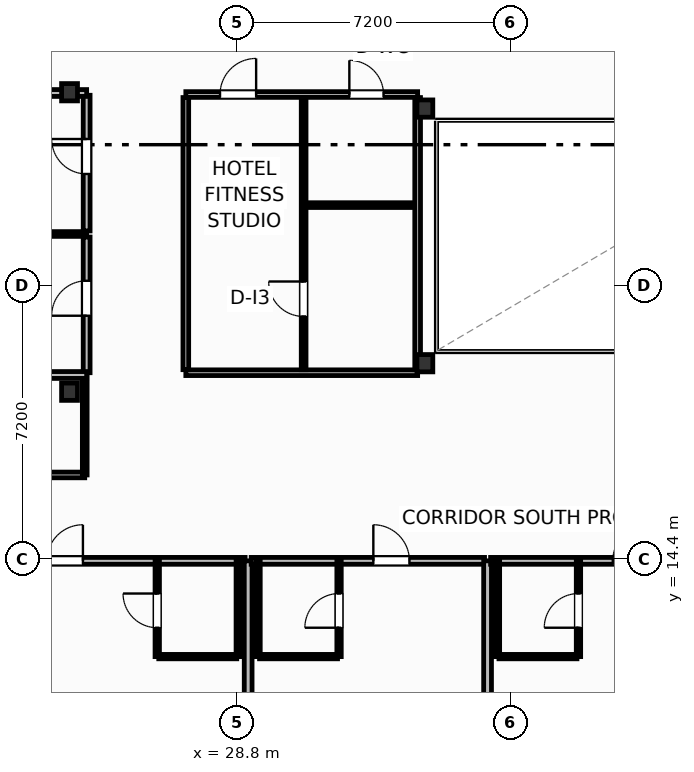
"""IFC4 building model, lengths in metres.
Left out: names, types, materials, properties, quantities, classifications, styles, units other than length and angle.
Written with IfcOpenShell. Run it as: python <this file> out.ifc"""

import sys

from ifc_helpers import new_model, si_unit, direction, frame, frame_2d, origin, origin_2d, place, context, subcontext, project, spatial, rectangle, i_section, extrude, element, fill, save


model = new_model("IFC4")
c1 = context("Model", 3, precision=1e-05, world=origin(), true_north=direction((0.0, 1.0)))
c2 = subcontext(c1, "Body", "Model", "MODEL_VIEW")
j1 = project(units=[si_unit("LENGTHUNIT", "METRE"), si_unit("PLANEANGLEUNIT", "RADIAN")], contexts=[c1])
p1 = place(None, origin())
s1 = spatial("IfcSite", under=j1, at=p1, CompositionType="ELEMENT")
p2 = place(p1, origin())
s2 = spatial("IfcBuilding", under=s1, at=p2, CompositionType="ELEMENT")
p3 = place(p2, frame((0.0, 0.0, 200.5)))
s3 = spatial("IfcBuildingStorey", under=s2, at=p3, CompositionType="ELEMENT", Elevation=200.5)
for number, where, z_axis, x_axis in (
    (1, (33.75, 19.55, 0.0), (0.0, 0.0, 1.0), (1.0, 0.0, 0.0)),
    (2, (33.75, 26.25, 0.0), (0.0, 0.0, 1.0), (1.0, 0.0, 0.0)),
    (3, (24.4, 18.8, 0.0), (0.0, 0.0, 1.0), (1.0, 0.0, 0.0)),
    (4, (24.4, 26.68, 0.0), (0.0, 0.0, 1.0), (1.0, 0.0, 0.0)),
):
    element("IfcColumn", number, at=place(p3, frame(where, z_axis=z_axis, x_axis=x_axis)), inside=s3, PredefinedType="COLUMN", context=c2, shape_type="SweptSolid", body=[
        extrude(i_section(OverallWidth=0.418, OverallDepth=0.455, WebThickness=0.042, FlangeThickness=0.068, FilletRadius=0.025, at=origin_2d()), origin(), (0.0, 0.0, 1.0), 3.7),
    ])
p4 = place(p3, frame((5.0, 16.61, 0.0), z_axis=(0.0, 0.0, 1.0), x_axis=(1.0, 0.0, 0.0)))
e5 = element("IfcWall", 5, at=p4, inside=s3, PredefinedType="PARTITIONING", context=c2, shape_type="SweptSolid", body=[
    extrude(rectangle(XDim=19.8, YDim=0.15, at=frame_2d((9.9, 0.0))), origin(), (0.0, 0.0, 1.0), 3.45),
])
p5 = place(p4, frame((12.485, 0.0, 0.0)))
e6 = element("IfcOpeningElement", 6, at=p5, cuts=e5, PredefinedType="OPENING", context=c2, shape_type="SweptSolid", body=[
    extrude(rectangle(XDim=0.92, YDim=2.05, at=frame_2d((0.46, 1.025))), frame((0.0, 0.085, 0.0), z_axis=(0.0, -1.0, 0.0), x_axis=(1.0, 0.0, 0.0)), (0.0, 0.0, 1.0), 0.17),
])
p6 = place(p3, frame((24.8, 16.61, 0.0), z_axis=(0.0, 0.0, 1.0), x_axis=(0.0, 1.0, 0.0)))
e7 = element("IfcWall", 7, at=p6, inside=s3, PredefinedType="PARTITIONING", context=c2, shape_type="SweptSolid", body=[
    extrude(rectangle(XDim=2.63, YDim=0.125, at=frame_2d((1.315, 0.0))), origin(), (0.0, 0.0, 1.0), 3.45),
])
p7 = place(p3, frame((22.88, 14.35, 0.0), z_axis=(0.0, 0.0, 1.0), x_axis=(1.0, 0.0, 0.0)))
e8 = element("IfcWall", 8, at=p7, inside=s3, PredefinedType="PARTITIONING", context=c2, shape_type="SweptSolid", body=[
    extrude(rectangle(XDim=6.14, YDim=0.18, at=frame_2d((3.07, 0.0))), origin(), (0.0, 0.0, 1.0), 3.45),
])
p8 = place(p7, frame((0.922, 0.0, 0.0)))
e9 = element("IfcOpeningElement", 9, at=p8, cuts=e8, PredefinedType="OPENING", context=c2, shape_type="SweptSolid", body=[
    extrude(rectangle(XDim=0.95, YDim=2.15, at=frame_2d((0.475, 1.075))), frame((0.0, 0.1, 0.0), z_axis=(0.0, -1.0, 0.0), x_axis=(1.0, 0.0, 0.0)), (0.0, 0.0, 1.0), 0.2),
])
p9 = place(p3, frame((26.748, 11.83, 0.0), z_axis=(0.0, 0.0, 1.0), x_axis=(1.0, 0.0, 0.0)))
e10 = element("IfcWall", 10, at=p9, inside=s3, PredefinedType="PARTITIONING", context=c2, shape_type="SweptSolid", body=[
    extrude(rectangle(XDim=2.052, YDim=0.115, at=frame_2d((1.026, 0.0))), origin(), (0.0, 0.0, 1.0), 3.45),
])
p10 = place(p3, frame((26.708, 11.83, 0.0), z_axis=(0.0, 0.0, 1.0), x_axis=(0.0, 1.0, 0.0)))
e11 = element("IfcWall", 11, at=p10, inside=s3, PredefinedType="PARTITIONING", context=c2, shape_type="SweptSolid", body=[
    extrude(rectangle(XDim=2.52, YDim=0.115, at=frame_2d((1.26, 0.0))), origin(), (0.0, 0.0, 1.0), 3.45),
])
p11 = place(p10, frame((0.76, 0.0, 0.0)))
e12 = element("IfcOpeningElement", 12, at=p11, cuts=e11, PredefinedType="OPENING", context=c2, shape_type="SweptSolid", body=[
    extrude(rectangle(XDim=0.9, YDim=2.05, at=frame_2d((0.45, 1.025))), frame((0.0, 0.067, 0.0), z_axis=(0.0, -1.0, 0.0), x_axis=(1.0, 0.0, 0.0)), (0.0, 0.0, 1.0), 0.135),
])
p12 = place(p3, frame((28.84, 11.83, 0.0), z_axis=(0.0, 0.0, 1.0), x_axis=(0.0, 1.0, 0.0)))
e13 = element("IfcWall", 13, at=p12, inside=s3, PredefinedType="PARTITIONING", context=c2, shape_type="SweptSolid", body=[
    extrude(rectangle(XDim=2.52, YDim=0.115, at=frame_2d((1.26, 0.0))), origin(), (0.0, 0.0, 1.0), 3.45),
])
p13 = place(p3, frame((29.1, 4.272, 0.0), z_axis=(0.0, 0.0, 1.0), x_axis=(0.0, 1.0, 0.0)))
e14 = element("IfcWall", 14, at=p13, inside=s3, PredefinedType="PARTITIONING", context=c2, shape_type="SweptSolid", body=[
    extrude(rectangle(XDim=10.078, YDim=0.205, at=frame_2d((5.039, 0.0))), origin(), (0.0, 0.0, 1.0), 3.45),
])
p14 = place(p3, frame((29.18, 14.35, 0.0), z_axis=(0.0, 0.0, 1.0), x_axis=(1.0, 0.0, 0.0)))
e15 = element("IfcWall", 15, at=p14, inside=s3, PredefinedType="PARTITIONING", context=c2, shape_type="SweptSolid", body=[
    extrude(rectangle(XDim=6.14, YDim=0.18, at=frame_2d((3.07, 0.0))), origin(), (0.0, 0.0, 1.0), 3.45),
])
p15 = place(p14, frame((3.214, 0.0, 0.0)))
e16 = element("IfcOpeningElement", 16, at=p15, cuts=e15, PredefinedType="OPENING", context=c2, shape_type="SweptSolid", body=[
    extrude(rectangle(XDim=0.95, YDim=2.15, at=frame_2d((0.475, 1.075))), frame((0.0, 0.1, 0.0), z_axis=(0.0, -1.0, 0.0), x_axis=(1.0, 0.0, 0.0)), (0.0, 0.0, 1.0), 0.2),
])
p16 = place(p3, frame((29.4, 11.83, 0.0), z_axis=(0.0, 0.0, 1.0), x_axis=(1.0, 0.0, 0.0)))
e17 = element("IfcWall", 17, at=p16, inside=s3, PredefinedType="PARTITIONING", context=c2, shape_type="SweptSolid", body=[
    extrude(rectangle(XDim=2.052, YDim=0.115, at=frame_2d((1.026, 0.0))), origin(), (0.0, 0.0, 1.0), 3.45),
])
p17 = place(p3, frame((31.492, 11.83, 0.0), z_axis=(0.0, 0.0, 1.0), x_axis=(0.0, 1.0, 0.0)))
e18 = element("IfcWall", 18, at=p17, inside=s3, PredefinedType="PARTITIONING", context=c2, shape_type="SweptSolid", body=[
    extrude(rectangle(XDim=2.52, YDim=0.115, at=frame_2d((1.26, 0.0))), origin(), (0.0, 0.0, 1.0), 3.45),
])
p18 = place(p17, frame((0.76, 0.0, 0.0)))
e19 = element("IfcOpeningElement", 19, at=p18, cuts=e18, PredefinedType="OPENING", context=c2, shape_type="SweptSolid", body=[
    extrude(rectangle(XDim=0.9, YDim=2.05, at=frame_2d((0.45, 1.025))), frame((0.0, 0.067, 0.0), z_axis=(0.0, -1.0, 0.0), x_axis=(1.0, 0.0, 0.0)), (0.0, 0.0, 1.0), 0.135),
])
p19 = place(p3, frame((29.36, 11.83, 0.0), z_axis=(0.0, 0.0, 1.0), x_axis=(0.0, 1.0, 0.0)))
e20 = element("IfcWall", 20, at=p19, inside=s3, PredefinedType="PARTITIONING", context=c2, shape_type="SweptSolid", body=[
    extrude(rectangle(XDim=2.52, YDim=0.115, at=frame_2d((1.26, 0.0))), origin(), (0.0, 0.0, 1.0), 3.45),
])
p20 = place(p3, frame((35.4, 2.92, 0.0), z_axis=(0.0, 0.0, 1.0), x_axis=(0.0, 1.0, 0.0)))
e21 = element("IfcWall", 21, at=p20, inside=s3, PredefinedType="PARTITIONING", context=c2, shape_type="SweptSolid", body=[
    extrude(rectangle(XDim=11.43, YDim=0.205, at=frame_2d((5.715, 0.0))), origin(), (0.0, 0.0, 1.0), 3.45),
])
p21 = place(p3, frame((35.48, 14.35, 0.0), z_axis=(0.0, 0.0, 1.0), x_axis=(1.0, 0.0, 0.0)))
e22 = element("IfcWall", 22, at=p21, inside=s3, PredefinedType="PARTITIONING", context=c2, shape_type="SweptSolid", body=[
    extrude(rectangle(XDim=6.14, YDim=0.18, at=frame_2d((3.07, 0.0))), origin(), (0.0, 0.0, 1.0), 3.45),
])
p22 = place(p21, frame((3.214, 0.0, 0.0)))
e23 = element("IfcOpeningElement", 23, at=p22, cuts=e22, PredefinedType="OPENING", context=c2, shape_type="SweptSolid", body=[
    extrude(rectangle(XDim=0.95, YDim=2.15, at=frame_2d((0.475, 1.075))), frame((0.0, 0.1, 0.0), z_axis=(0.0, -1.0, 0.0), x_axis=(1.0, 0.0, 0.0)), (0.0, 0.0, 1.0), 0.2),
])
p23 = place(p3, frame((35.7, 11.83, 0.0), z_axis=(0.0, 0.0, 1.0), x_axis=(1.0, 0.0, 0.0)))
e24 = element("IfcWall", 24, at=p23, inside=s3, PredefinedType="PARTITIONING", context=c2, shape_type="SweptSolid", body=[
    extrude(rectangle(XDim=2.052, YDim=0.115, at=frame_2d((1.026, 0.0))), origin(), (0.0, 0.0, 1.0), 3.45),
])
p24 = place(p3, frame((37.792, 11.83, 0.0), z_axis=(0.0, 0.0, 1.0), x_axis=(0.0, 1.0, 0.0)))
e25 = element("IfcWall", 25, at=p24, inside=s3, PredefinedType="PARTITIONING", context=c2, shape_type="SweptSolid", body=[
    extrude(rectangle(XDim=2.52, YDim=0.115, at=frame_2d((1.26, 0.0))), origin(), (0.0, 0.0, 1.0), 3.45),
])
p25 = place(p24, frame((0.76, 0.0, 0.0)))
e26 = element("IfcOpeningElement", 26, at=p25, cuts=e25, PredefinedType="OPENING", context=c2, shape_type="SweptSolid", body=[
    extrude(rectangle(XDim=0.9, YDim=2.05, at=frame_2d((0.45, 1.025))), frame((0.0, 0.067, 0.0), z_axis=(0.0, -1.0, 0.0), x_axis=(1.0, 0.0, 0.0)), (0.0, 0.0, 1.0), 0.135),
])
p26 = place(p3, frame((35.66, 11.83, 0.0), z_axis=(0.0, 0.0, 1.0), x_axis=(0.0, 1.0, 0.0)))
e27 = element("IfcWall", 27, at=p26, inside=s3, PredefinedType="PARTITIONING", context=c2, shape_type="SweptSolid", body=[
    extrude(rectangle(XDim=2.52, YDim=0.115, at=frame_2d((1.26, 0.0))), origin(), (0.0, 0.0, 1.0), 3.45),
])
p27 = place(p3, frame((24.85, 19.3, 0.0), z_axis=(0.0, 0.0, 1.0), x_axis=(0.0, 1.0, 0.0)))
e28 = element("IfcWall", 28, at=p27, inside=s3, PredefinedType="PARTITIONING", context=c2, shape_type="SweptSolid", body=[
    extrude(rectangle(XDim=3.57, YDim=0.18, at=frame_2d((1.785, 0.0))), origin(), (0.0, 0.0, 1.0), 3.45),
])
p28 = place(p27, frame((1.5, 0.0, 0.0)))
e29 = element("IfcOpeningElement", 29, at=p28, cuts=e28, PredefinedType="OPENING", context=c2, shape_type="SweptSolid", body=[
    extrude(rectangle(XDim=0.92, YDim=2.05, at=frame_2d((0.46, 1.025))), frame((0.0, 0.1, 0.0), z_axis=(0.0, -1.0, 0.0), x_axis=(1.0, 0.0, 0.0)), (0.0, 0.0, 1.0), 0.2),
])
p29 = place(p3, frame((24.85, 23.03, 0.0), z_axis=(0.0, 0.0, 1.0), x_axis=(0.0, 1.0, 0.0)))
e30 = element("IfcWall", 30, at=p29, inside=s3, PredefinedType="PARTITIONING", context=c2, shape_type="SweptSolid", body=[
    extrude(rectangle(XDim=3.57, YDim=0.18, at=frame_2d((1.785, 0.0))), origin(), (0.0, 0.0, 1.0), 3.45),
])
p30 = place(p29, frame((1.5, 0.0, 0.0)))
e31 = element("IfcOpeningElement", 31, at=p30, cuts=e30, PredefinedType="OPENING", context=c2, shape_type="SweptSolid", body=[
    extrude(rectangle(XDim=0.92, YDim=2.05, at=frame_2d((0.46, 1.025))), frame((0.0, 0.1, 0.0), z_axis=(0.0, -1.0, 0.0), x_axis=(1.0, 0.0, 0.0)), (0.0, 0.0, 1.0), 0.2),
])
p31 = place(p3, frame((4.107, 22.95, 0.0), z_axis=(0.0, 0.0, 1.0), x_axis=(1.0, 0.0, 0.0)))
e32 = element("IfcWall", 32, at=p31, inside=s3, PredefinedType="PARTITIONING", context=c2, shape_type="SweptSolid", body=[
    extrude(rectangle(XDim=20.743, YDim=0.125, at=frame_2d((10.371, 0.0))), origin(), (0.0, 0.0, 1.0), 2.662),
])
p32 = place(p3, frame((4.557, 19.24, 0.0), z_axis=(0.0, 0.0, 1.0), x_axis=(1.0, 0.0, 0.0)))
e33 = element("IfcWall", 33, at=p32, inside=s3, PredefinedType="PARTITIONING", context=c2, shape_type="SweptSolid", body=[
    extrude(rectangle(XDim=20.293, YDim=0.18, at=frame_2d((10.146, 0.0))), origin(), (0.0, 0.0, 1.0), 3.45),
])
p33 = place(p3, frame((3.658, 26.66, 0.0), z_axis=(0.0, 0.0, 1.0), x_axis=(1.0, 0.0, 0.0)))
e34 = element("IfcWall", 34, at=p33, inside=s3, PredefinedType="PARTITIONING", context=c2, shape_type="SweptSolid", body=[
    extrude(rectangle(XDim=21.192, YDim=0.18, at=frame_2d((10.596, 0.0))), origin(), (0.0, 0.0, 1.0), 2.662),
])
p34 = place(p3, frame((27.46, 26.62, 0.0), z_axis=(0.0, 0.0, 1.0), x_axis=(1.0, 0.0, 0.0)))
e35 = element("IfcWall", 35, at=p34, inside=s3, PredefinedType="PARTITIONING", context=c2, shape_type="SweptSolid", body=[
    extrude(rectangle(XDim=6.1, YDim=0.15, at=frame_2d((3.05, 0.0))), origin(), (0.0, 0.0, 1.0), 2.662),
])
p35 = place(p34, frame((0.9, 0.0, 0.0)))
e36 = element("IfcOpeningElement", 36, at=p35, cuts=e35, PredefinedType="OPENING", context=c2, shape_type="SweptSolid", body=[
    extrude(rectangle(XDim=0.95, YDim=2.05, at=frame_2d((0.475, 1.025))), frame((0.0, 0.085, 0.0), z_axis=(0.0, -1.0, 0.0), x_axis=(1.0, 0.0, 0.0)), (0.0, 0.0, 1.0), 0.17),
])
p36 = place(p34, frame((4.303, 0.0, 0.0)))
e37 = element("IfcOpeningElement", 37, at=p36, cuts=e35, PredefinedType="OPENING", context=c2, shape_type="SweptSolid", body=[
    extrude(rectangle(XDim=0.9, YDim=2.05, at=frame_2d((0.45, 1.025))), frame((0.0, 0.085, 0.0), z_axis=(0.0, -1.0, 0.0), x_axis=(1.0, 0.0, 0.0)), (0.0, 0.0, 1.0), 0.17),
])
p37 = place(p3, frame((27.46, 19.3, 0.0), z_axis=(0.0, 0.0, 1.0), x_axis=(1.0, 0.0, 0.0)))
e38 = element("IfcWall", 38, at=p37, inside=s3, PredefinedType="PARTITIONING", context=c2, shape_type="SweptSolid", body=[
    extrude(rectangle(XDim=6.1, YDim=0.15, at=frame_2d((3.05, 0.0))), origin(), (0.0, 0.0, 1.0), 2.662),
])
p38 = place(p3, frame((30.56, 19.38, 0.0), z_axis=(0.0, 0.0, 1.0), x_axis=(0.0, 1.0, 0.0)))
e39 = element("IfcWall", 39, at=p38, inside=s3, PredefinedType="PARTITIONING", context=c2, shape_type="SweptSolid", body=[
    extrude(rectangle(XDim=7.16, YDim=0.125, at=frame_2d((3.58, 0.0))), origin(), (0.0, 0.0, 1.0), 3.45),
])
p39 = place(p38, frame((1.4, 0.0, 0.0)))
e40 = element("IfcOpeningElement", 40, at=p39, cuts=e39, PredefinedType="OPENING", context=c2, shape_type="SweptSolid", body=[
    extrude(rectangle(XDim=0.92, YDim=2.05, at=frame_2d((0.46, 1.025))), frame((0.0, 0.073, 0.0), z_axis=(0.0, -1.0, 0.0), x_axis=(1.0, 0.0, 0.0)), (0.0, 0.0, 1.0), 0.145),
])
p40 = place(p3, frame((30.64, 23.71, 0.0), z_axis=(0.0, 0.0, 1.0), x_axis=(1.0, 0.0, 0.0)))
e41 = element("IfcWall", 41, at=p40, inside=s3, PredefinedType="PARTITIONING", context=c2, shape_type="SweptSolid", body=[
    extrude(rectangle(XDim=2.88, YDim=0.125, at=frame_2d((1.44, 0.0))), origin(), (0.0, 0.0, 1.0), 3.45),
])
p41 = place(p3, frame((27.46, 19.38, 0.0), z_axis=(0.0, 0.0, 1.0), x_axis=(0.0, 1.0, 0.0)))
e42 = element("IfcWall", 42, at=p41, inside=s3, PredefinedType="PARTITIONING", context=c2, shape_type="SweptSolid", body=[
    extrude(rectangle(XDim=7.16, YDim=0.15, at=frame_2d((3.58, 0.0))), origin(), (0.0, 0.0, 1.0), 3.45),
])
p42 = place(p3, frame((33.56, 19.38, 0.0), z_axis=(0.0, 0.0, 1.0), x_axis=(0.0, 1.0, 0.0)))
e43 = element("IfcWall", 43, at=p42, inside=s3, PredefinedType="PARTITIONING", context=c2, shape_type="SweptSolid", body=[
    extrude(rectangle(XDim=7.16, YDim=0.15, at=frame_2d((3.58, 0.0))), origin(), (0.0, 0.0, 1.0), 2.824),
])
p43 = place(p8, origin())
e44 = element("IfcDoor", 44, at=p43, inside=s3, OperationType="SINGLE_SWING_RIGHT", PredefinedType="DOOR", context=c2, shape_type="SweptSolid", body=[
    extrude(rectangle(XDim=0.95, YDim=2.15, at=frame_2d((0.475, 1.075))), frame((0.0, 0.025, 0.0), z_axis=(0.0, -1.0, 0.0), x_axis=(1.0, 0.0, 0.0)), (0.0, 0.0, 1.0), 0.05),
])
fill(e9, e44)
p44 = place(p11, origin())
e45 = element("IfcDoor", 45, at=p44, inside=s3, OperationType="SINGLE_SWING_RIGHT", PredefinedType="DOOR", context=c2, shape_type="SweptSolid", body=[
    extrude(rectangle(XDim=0.9, YDim=2.05, at=frame_2d((0.45, 1.025))), frame((0.0, 0.025, 0.0), z_axis=(0.0, -1.0, 0.0), x_axis=(1.0, 0.0, 0.0)), (0.0, 0.0, 1.0), 0.05),
])
fill(e12, e45)
p45 = place(p15, origin())
e46 = element("IfcDoor", 46, at=p45, inside=s3, OperationType="SINGLE_SWING_LEFT", PredefinedType="DOOR", context=c2, shape_type="SweptSolid", body=[
    extrude(rectangle(XDim=0.95, YDim=2.15, at=frame_2d((0.475, 1.075))), frame((0.0, 0.025, 0.0), z_axis=(0.0, -1.0, 0.0), x_axis=(1.0, 0.0, 0.0)), (0.0, 0.0, 1.0), 0.05),
])
fill(e16, e46)
p46 = place(p18, origin())
e47 = element("IfcDoor", 47, at=p46, inside=s3, OperationType="SINGLE_SWING_LEFT", PredefinedType="DOOR", context=c2, shape_type="SweptSolid", body=[
    extrude(rectangle(XDim=0.9, YDim=2.05, at=frame_2d((0.45, 1.025))), frame((0.0, 0.025, 0.0), z_axis=(0.0, -1.0, 0.0), x_axis=(1.0, 0.0, 0.0)), (0.0, 0.0, 1.0), 0.05),
])
fill(e19, e47)
p47 = place(p22, origin())
e48 = element("IfcDoor", 48, at=p47, inside=s3, OperationType="SINGLE_SWING_RIGHT", PredefinedType="DOOR", context=c2, shape_type="SweptSolid", body=[
    extrude(rectangle(XDim=0.95, YDim=2.15, at=frame_2d((0.475, 1.075))), frame((0.0, 0.025, 0.0), z_axis=(0.0, -1.0, 0.0), x_axis=(1.0, 0.0, 0.0)), (0.0, 0.0, 1.0), 0.05),
])
fill(e23, e48)
p48 = place(p25, origin())
e49 = element("IfcDoor", 49, at=p48, inside=s3, OperationType="SINGLE_SWING_LEFT", PredefinedType="DOOR", context=c2, shape_type="SweptSolid", body=[
    extrude(rectangle(XDim=0.9, YDim=2.05, at=frame_2d((0.45, 1.025))), frame((0.0, 0.025, 0.0), z_axis=(0.0, -1.0, 0.0), x_axis=(1.0, 0.0, 0.0)), (0.0, 0.0, 1.0), 0.05),
])
fill(e26, e49)
p49 = place(p28, origin())
e50 = element("IfcDoor", 50, at=p49, inside=s3, OperationType="SINGLE_SWING_LEFT", PredefinedType="DOOR", context=c2, shape_type="SweptSolid", body=[
    extrude(rectangle(XDim=0.92, YDim=2.05, at=frame_2d((0.46, 1.025))), frame((0.0, 0.025, 0.0), z_axis=(0.0, -1.0, 0.0), x_axis=(1.0, 0.0, 0.0)), (0.0, 0.0, 1.0), 0.05),
])
fill(e29, e50)
p50 = place(p30, origin())
e51 = element("IfcDoor", 51, at=p50, inside=s3, OperationType="SINGLE_SWING_RIGHT", PredefinedType="DOOR", context=c2, shape_type="SweptSolid", body=[
    extrude(rectangle(XDim=0.92, YDim=2.05, at=frame_2d((0.46, 1.025))), frame((0.0, 0.025, 0.0), z_axis=(0.0, -1.0, 0.0), x_axis=(1.0, 0.0, 0.0)), (0.0, 0.0, 1.0), 0.05),
])
fill(e31, e51)
p51 = place(p35, origin())
e52 = element("IfcDoor", 52, at=p51, inside=s3, OperationType="SINGLE_SWING_RIGHT", PredefinedType="DOOR", context=c2, shape_type="SweptSolid", body=[
    extrude(rectangle(XDim=0.95, YDim=2.05, at=frame_2d((0.475, 1.025))), frame((0.0, 0.025, 0.0), z_axis=(0.0, -1.0, 0.0), x_axis=(1.0, 0.0, 0.0)), (0.0, 0.0, 1.0), 0.05),
])
fill(e36, e52)
p52 = place(p36, origin())
e53 = element("IfcDoor", 53, at=p52, inside=s3, OperationType="SINGLE_SWING_LEFT", PredefinedType="DOOR", context=c2, shape_type="SweptSolid", body=[
    extrude(rectangle(XDim=0.9, YDim=2.05, at=frame_2d((0.45, 1.025))), frame((0.0, 0.025, 0.0), z_axis=(0.0, -1.0, 0.0), x_axis=(1.0, 0.0, 0.0)), (0.0, 0.0, 1.0), 0.05),
])
fill(e37, e53)
p53 = place(p39, origin())
e54 = element("IfcDoor", 54, at=p53, inside=s3, OperationType="SINGLE_SWING_RIGHT", PredefinedType="DOOR", context=c2, shape_type="SweptSolid", body=[
    extrude(rectangle(XDim=0.92, YDim=2.05, at=frame_2d((0.46, 1.025))), frame((0.0, 0.025, 0.0), z_axis=(0.0, -1.0, 0.0), x_axis=(1.0, 0.0, 0.0)), (0.0, 0.0, 1.0), 0.05),
])
fill(e40, e54)
save(model, sys.argv[1])
